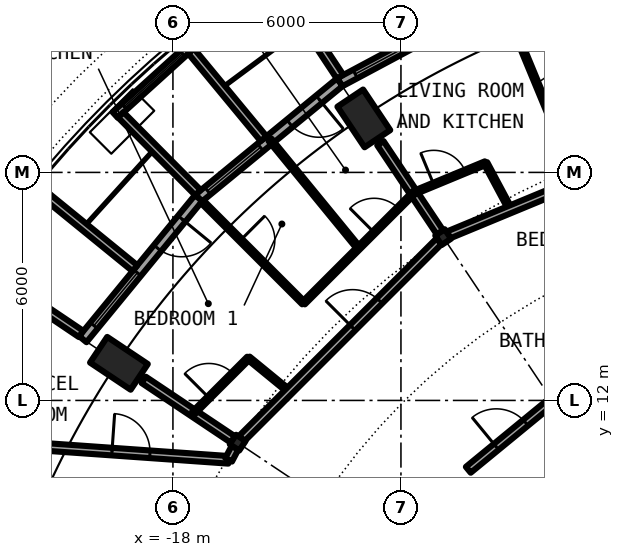
"""IFC4 building model, lengths in metres.
Left out: names, types, materials, properties, quantities, classifications, styles, units other than length and angle.
Written with IfcOpenShell. Run it as: python <this file> out.ifc"""

import sys

from ifc_helpers import new_model, si_unit, direction, frame, frame_2d, origin, origin_2d, place, context, subcontext, project, spatial, rectangle, circle, hollow_circle, i_section, extrude, element, fill, save


model = new_model("IFC4")
c1 = context("Model", 3, precision=1e-05, world=origin(), true_north=direction((0.0, 1.0)))
c2 = subcontext(c1, "Body", "Model", "MODEL_VIEW")
j1 = project(units=[si_unit("LENGTHUNIT", "METRE"), si_unit("PLANEANGLEUNIT", "RADIAN")], contexts=[c1])
p1 = place(None, origin())
s1 = spatial("IfcSite", under=j1, at=p1, CompositionType="ELEMENT")
p2 = place(p1, origin())
s2 = spatial("IfcBuilding", under=s1, at=p2, CompositionType="ELEMENT")
p3 = place(p2, frame((0.0, 0.0, 246.25)))
s3 = spatial("IfcBuildingStorey", under=s2, at=p3, CompositionType="ELEMENT", Elevation=246.25)
for number, where, z_axis, x_axis in (
    (1, (-13.334, 19.955, 0.0), (0.232, -0.347, 0.909), (0.831, 0.556, 0.0)),
    (2, (-19.955, 13.334, 0.0), (0.347, -0.232, 0.909), (0.556, 0.831, 0.0)),
):
    element("IfcColumn", number, at=place(p3, frame(where, z_axis=z_axis, x_axis=x_axis)), inside=s3, PredefinedType="COLUMN", context=c2, shape_type="SweptSolid", body=[
        extrude(hollow_circle(Radius=0.406, WallThickness=0.03, at=origin_2d()), origin(), (0.0, 0.0, 1.0), 3.081),
    ])
for number, where, z_axis, x_axis in (
    (3, (-10.889, 16.297, 0.0), (0.0, 0.0, 1.0), (-0.556, 0.831, 0.0)),
    (4, (-16.297, 10.889, 0.0), (0.0, 0.0, 1.0), (-0.831, 0.556, 0.0)),
):
    element("IfcColumn", number, at=place(p3, frame(where, z_axis=z_axis, x_axis=x_axis)), inside=s3, PredefinedType="COLUMN", context=c2, shape_type="SweptSolid", body=[
        extrude(i_section(OverallWidth=0.3, OverallDepth=0.3, WebThickness=0.011, FlangeThickness=0.019, FilletRadius=0.027, at=origin_2d()), origin(), (0.0, 0.0, 1.0), 3.05),
    ])
p4 = place(p3, frame((-9.376, 22.635, 0.0), z_axis=(0.0, 0.0, 1.0), x_axis=(-0.881903608701, -0.471429766731, 0.0)))
e5 = element("IfcWall", 5, at=p4, inside=s3, PredefinedType="SOLIDWALL", context=c2, shape_type="SweptSolid", body=[
    extrude(rectangle(XDim=4.802, YDim=0.25, at=frame_2d((2.401, 0.0))), origin(), (0.0, 0.0, 1.0), 2.7),
])
p5 = place(p4, frame((0.704, 0.0, 0.0)))
e6 = element("IfcOpeningElement", 6, at=p5, cuts=e5, PredefinedType="OPENING", context=c2, shape_type="SweptSolid", body=[
    extrude(rectangle(XDim=1.0, YDim=2.2, at=frame_2d((0.5, 1.1))), frame((0.0, 0.135, 0.0), z_axis=(0.0, -1.0, 0.0), x_axis=(1.0, 0.0, 0.0)), (0.0, 0.0, 1.0), 0.27),
])
p6 = place(p4, frame((2.542, 0.0, 0.3)))
e7 = element("IfcOpeningElement", 7, at=p6, cuts=e5, PredefinedType="OPENING", context=c2, shape_type="SweptSolid", body=[
    extrude(rectangle(XDim=1.8, YDim=2.1, at=frame_2d((0.9, 1.05))), frame((0.0, 0.135, 0.0), z_axis=(0.0, -1.0, 0.0), x_axis=(1.0, 0.0, 0.0)), (0.0, 0.0, 1.0), 0.27),
])
p7 = place(p3, frame((-13.603, 20.518, -0.03), z_axis=(0.0, 0.0, 1.0), x_axis=(-0.55248888476, 0.833520265031, 0.0)))
e8 = element("IfcWall", 8, at=p7, inside=s3, PredefinedType="SOLIDWALL", context=c2, shape_type="SweptSolid", body=[
    extrude(rectangle(XDim=2.882, YDim=0.2, at=frame_2d((1.441, 0.0))), origin(), (0.0, 0.0, 1.0), 2.73),
])
p8 = place(p3, frame((-13.611, 20.371, 0.0), z_axis=(0.0, 0.0, 1.0), x_axis=(-0.773007538262, -0.634396836208, 0.0)))
e9 = element("IfcWall", 9, at=p8, inside=s3, PredefinedType="SOLIDWALL", context=c2, shape_type="SweptSolid", body=[
    extrude(rectangle(XDim=4.803, YDim=0.25, at=frame_2d((2.402, 0.0))), origin(), (0.0, 0.0, 1.0), 2.7),
])
p9 = place(p8, frame((0.704, 0.0, 0.0)))
e10 = element("IfcOpeningElement", 10, at=p9, cuts=e9, PredefinedType="OPENING", context=c2, shape_type="SweptSolid", body=[
    extrude(rectangle(XDim=1.0, YDim=2.2, at=frame_2d((0.5, 1.1))), frame((0.0, 0.135, 0.0), z_axis=(0.0, -1.0, 0.0), x_axis=(1.0, 0.0, 0.0)), (0.0, 0.0, 1.0), 0.27),
])
p10 = place(p8, frame((2.699, 0.0, 0.3)))
e11 = element("IfcOpeningElement", 11, at=p10, cuts=e9, PredefinedType="OPENING", context=c2, shape_type="SweptSolid", body=[
    extrude(rectangle(XDim=1.8, YDim=2.1, at=frame_2d((0.9, 1.05))), frame((0.0, 0.135, 0.0), z_axis=(0.0, -1.0, 0.0), x_axis=(1.0, 0.0, 0.0)), (0.0, 0.0, 1.0), 0.27),
])
p11 = place(p3, frame((-17.506, 21.338, -0.03), z_axis=(0.0, 0.0, 1.0), x_axis=(-0.741016284298, -0.671487056022, 0.0)))
e12 = element("IfcWall", 12, at=p11, inside=s3, PredefinedType="SOLIDWALL", context=c2, shape_type="SweptSolid", body=[
    extrude(rectangle(XDim=2.718, YDim=0.2, at=frame_2d((1.359, 0.0))), origin(), (0.0, 0.0, 1.0), 2.73),
])
p12 = place(p11, frame((0.319, 0.0, 0.33)))
e13 = element("IfcOpeningElement", 13, at=p12, cuts=e12, PredefinedType="OPENING", context=c2, shape_type="SweptSolid", body=[
    extrude(circle(Radius=1.04, at=frame_2d((1.04, 1.04))), frame((0.0, 0.11, 0.0), z_axis=(0.0, -1.0, 0.0), x_axis=(1.0, 0.0, 0.0)), (0.0, 0.0, 1.0), 0.22),
])
p13 = place(p3, frame((-15.615, 18.888, -0.03), z_axis=(0.0, 0.0, 1.0), x_axis=(-0.637452521862, 0.770489638069, 0.0)))
e14 = element("IfcWall", 14, at=p13, inside=s3, PredefinedType="SOLIDWALL", context=c2, shape_type="SweptSolid", body=[
    extrude(rectangle(XDim=2.993, YDim=0.2, at=frame_2d((1.497, 0.0))), origin(), (0.0, 0.0, 1.0), 2.73),
])
p14 = place(p3, frame((-17.344, 17.47, -0.03), z_axis=(0.0, 0.0, 1.0), x_axis=(-0.704306055012, 0.709896457854, 0.0)))
e15 = element("IfcWall", 15, at=p14, inside=s3, PredefinedType="SOLIDWALL", context=c2, shape_type="SweptSolid", body=[
    extrude(rectangle(XDim=2.882, YDim=0.2, at=frame_2d((1.441, 0.0))), origin(), (0.0, 0.0, 1.0), 2.73),
])
p15 = place(p3, frame((-17.324, 17.324, 0.0), z_axis=(0.0, 0.0, 1.0), x_axis=(-0.634396836208, -0.773007538262, 0.0)))
e16 = element("IfcWall", 16, at=p15, inside=s3, PredefinedType="SOLIDWALL", context=c2, shape_type="SweptSolid", body=[
    extrude(rectangle(XDim=4.803, YDim=0.25, at=frame_2d((2.402, 0.0))), origin(), (0.0, 0.0, 1.0), 2.7),
])
p16 = place(p15, frame((0.704, 0.0, 0.0)))
e17 = element("IfcOpeningElement", 17, at=p16, cuts=e16, PredefinedType="OPENING", context=c2, shape_type="SweptSolid", body=[
    extrude(rectangle(XDim=1.0, YDim=2.2, at=frame_2d((0.5, 1.1))), frame((0.0, 0.135, 0.0), z_axis=(0.0, -1.0, 0.0), x_axis=(1.0, 0.0, 0.0)), (0.0, 0.0, 1.0), 0.27),
])
p17 = place(p15, frame((2.542, 0.0, 0.3)))
e18 = element("IfcOpeningElement", 18, at=p17, cuts=e16, PredefinedType="OPENING", context=c2, shape_type="SweptSolid", body=[
    extrude(rectangle(XDim=1.8, YDim=2.1, at=frame_2d((0.9, 1.05))), frame((0.0, 0.135, 0.0), z_axis=(0.0, -1.0, 0.0), x_axis=(1.0, 0.0, 0.0)), (0.0, 0.0, 1.0), 0.27),
])
p18 = place(p3, frame((-19.0, 15.479, -0.03), z_axis=(0.0, 0.0, 1.0), x_axis=(-0.775612161439, 0.631209771017, 0.0)))
e19 = element("IfcWall", 19, at=p18, inside=s3, PredefinedType="SOLIDWALL", context=c2, shape_type="SweptSolid", body=[
    extrude(rectangle(XDim=2.992, YDim=0.2, at=frame_2d((1.496, 0.0))), origin(), (0.0, 0.0, 1.0), 2.73),
])
p19 = place(p3, frame((-20.419, 13.75, -0.03), z_axis=(0.0, 0.0, 1.0), x_axis=(-0.829211810515, 0.558934498222, 0.0)))
e20 = element("IfcWall", 20, at=p19, inside=s3, PredefinedType="SOLIDWALL", context=c2, shape_type="SweptSolid", body=[
    extrude(rectangle(XDim=2.882, YDim=0.2, at=frame_2d((1.441, 0.0))), origin(), (0.0, 0.0, 1.0), 2.73),
])
p20 = place(p3, frame((-9.774, 18.245, 0.0), z_axis=(0.0, 0.0, 1.0), x_axis=(0.471597872193, -0.881813725762, 0.0)))
e21 = element("IfcWall", 21, at=p20, inside=s3, PredefinedType="PARTITIONING", context=c2, shape_type="SweptSolid", body=[
    extrude(rectangle(XDim=1.38, YDim=0.1, at=frame_2d((0.69, 0.0))), origin(), (0.0, 0.0, 1.0), 2.7),
])
p21 = place(p3, frame((-18.769, 12.541, 0.0), z_axis=(0.0, 0.0, 1.0), x_axis=(0.83131782921, -0.555797325324, 0.0)))
e22 = element("IfcWall", 22, at=p21, inside=s3, PredefinedType="PARTITIONING", context=c2, shape_type="SweptSolid", body=[
    extrude(rectangle(XDim=2.823, YDim=0.2, at=frame_2d((1.412, 0.0))), origin(), (0.0, 0.0, 1.0), 2.7),
])
p22 = place(p3, frame((-17.236, 17.236, 0.0), z_axis=(0.0, 0.0, 1.0), x_axis=(0.707106781187, -0.707106781187, 0.0)))
e23 = element("IfcWall", 23, at=p22, inside=s3, PredefinedType="PARTITIONING", context=c2, shape_type="SweptSolid", body=[
    extrude(rectangle(XDim=3.779, YDim=0.1, at=frame_2d((1.89, 0.0))), origin(), (0.0, 0.0, 1.0), 2.7),
])
p23 = place(p22, frame((1.439, 0.0, 0.0)))
e24 = element("IfcOpeningElement", 24, at=p23, cuts=e23, PredefinedType="OPENING", context=c2, shape_type="SweptSolid", body=[
    extrude(rectangle(XDim=0.9, YDim=2.3, at=frame_2d((0.45, 1.15))), frame((0.0, 0.06, 0.0), z_axis=(0.0, -1.0, 0.0), x_axis=(1.0, 0.0, 0.0)), (0.0, 0.0, 1.0), 0.12),
])
p24 = place(p3, frame((-16.012, 13.115, 0.0), z_axis=(0.0, 0.0, 1.0), x_axis=(0.773562805085, -0.633719643525, 0.0)))
e25 = element("IfcWall", 25, at=p24, inside=s3, PredefinedType="PARTITIONING", context=c2, shape_type="SweptSolid", body=[
    extrude(rectangle(XDim=1.379, YDim=0.1, at=frame_2d((0.689, 0.0))), origin(), (0.0, 0.0, 1.0), 2.7),
])
p25 = place(p3, frame((-15.445, 18.857, 0.0), z_axis=(0.0, 0.0, 1.0), x_axis=(0.633624546958, -0.773640700514, 0.0)))
e26 = element("IfcWall", 26, at=p25, inside=s3, PredefinedType="PARTITIONING", context=c2, shape_type="SweptSolid", body=[
    extrude(rectangle(XDim=3.677, YDim=0.1, at=frame_2d((1.839, 0.0))), origin(), (0.0, 0.0, 1.0), 2.7),
])
p26 = place(p3, frame((-12.541, 18.769, 0.0), z_axis=(0.0, 0.0, 1.0), x_axis=(0.555797325324, -0.83131782921, 0.0)))
e27 = element("IfcWall", 27, at=p26, inside=s3, PredefinedType="PARTITIONING", context=c2, shape_type="SweptSolid", body=[
    extrude(rectangle(XDim=2.823, YDim=0.2, at=frame_2d((1.412, 0.0))), origin(), (0.0, 0.0, 1.0), 2.7),
])
p27 = place(p3, frame((-9.328, 22.52, 0.0), z_axis=(0.0, 0.0, 1.0), x_axis=(0.382637120452, -0.923898714174, 0.0)))
e28 = element("IfcWall", 28, at=p27, inside=s3, PredefinedType="PARTITIONING", context=c2, shape_type="SweptSolid", body=[
    extrude(rectangle(XDim=3.779, YDim=0.1, at=frame_2d((1.889, 0.0))), origin(), (0.0, 0.0, 1.0), 2.7),
])
p28 = place(p27, frame((1.439, 0.0, 0.0)))
e29 = element("IfcOpeningElement", 29, at=p28, cuts=e28, PredefinedType="OPENING", context=c2, shape_type="SweptSolid", body=[
    extrude(rectangle(XDim=0.9, YDim=2.3, at=frame_2d((0.45, 1.15))), frame((0.0, 0.06, 0.0), z_axis=(0.0, -1.0, 0.0), x_axis=(1.0, 0.0, 0.0)), (0.0, 0.0, 1.0), 0.12),
])
p29 = place(p3, frame((-21.675, 10.8, 0.0), z_axis=(0.0, 0.0, 1.0), x_axis=(0.997515141784, -0.070452408845, 0.0)))
e30 = element("IfcWall", 30, at=p29, inside=s3, PredefinedType="PARTITIONING", context=c2, shape_type="SweptSolid", body=[
    extrude(rectangle(XDim=5.153, YDim=0.2, at=frame_2d((2.576, 0.0))), origin(), (0.0, 0.0, 1.0), 2.7),
])
p30 = place(p29, frame((2.076, 0.0, 0.0)))
e31 = element("IfcOpeningElement", 31, at=p30, cuts=e30, PredefinedType="OPENING", context=c2, shape_type="SweptSolid", body=[
    extrude(rectangle(XDim=1.0, YDim=2.3, at=frame_2d((0.5, 1.15))), frame((0.0, 0.11, 0.0), z_axis=(0.0, -1.0, 0.0), x_axis=(1.0, 0.0, 0.0)), (0.0, 0.0, 1.0), 0.22),
])
p31 = place(p3, frame((-10.228, 10.175, 0.0), z_axis=(0.0, 0.0, 1.0), x_axis=(0.772989261861, 0.634419105204, 0.0)))
e32 = element("IfcWall", 32, at=p31, inside=s3, PredefinedType="PARTITIONING", context=c2, shape_type="SweptSolid", body=[
    extrude(rectangle(XDim=5.803, YDim=0.2, at=frame_2d((2.902, 0.0))), origin(), (0.0, 0.0, 1.0), 2.7),
])
p32 = place(p31, frame((0.952, 0.0, 0.0)))
e33 = element("IfcOpeningElement", 33, at=p32, cuts=e32, PredefinedType="OPENING", context=c2, shape_type="SweptSolid", body=[
    extrude(rectangle(XDim=1.0, YDim=2.3, at=frame_2d((0.5, 1.15))), frame((0.0, 0.11, 0.0), z_axis=(0.0, -1.0, 0.0), x_axis=(1.0, 0.0, 0.0)), (0.0, 0.0, 1.0), 0.22),
])
p33 = place(p3, frame((-16.189, 10.997, 0.0), z_axis=(0.0, 0.0, 1.0), x_axis=(0.707106781187, 0.707106781187, 0.0)))
e34 = element("IfcWall", 34, at=p33, inside=s3, PredefinedType="PARTITIONING", context=c2, shape_type="SweptSolid", body=[
    extrude(rectangle(XDim=7.343, YDim=0.2, at=frame_2d((3.671, 0.0))), origin(), (0.0, 0.0, 1.0), 2.45),
])
p34 = place(p33, frame((4.127, 0.0, 0.0)))
e35 = element("IfcOpeningElement", 35, at=p34, cuts=e34, PredefinedType="OPENING", context=c2, shape_type="SweptSolid", body=[
    extrude(rectangle(XDim=1.0, YDim=2.3, at=frame_2d((0.5, 1.15))), frame((0.0, 0.11, 0.0), z_axis=(0.0, -1.0, 0.0), x_axis=(1.0, 0.0, 0.0)), (0.0, 0.0, 1.0), 0.22),
])
p35 = place(p3, frame((-10.748, 16.355, 0.0), z_axis=(0.0, 0.0, 1.0), x_axis=(0.92395118465, 0.382510402975, 0.0)))
e36 = element("IfcWall", 36, at=p35, inside=s3, PredefinedType="PARTITIONING", context=c2, shape_type="SweptSolid", body=[
    extrude(rectangle(XDim=7.341, YDim=0.2, at=frame_2d((3.671, 0.0))), origin(), (0.0, 0.0, 1.0), 2.45),
])
p36 = place(p35, frame((4.127, 0.0, 0.0)))
e37 = element("IfcOpeningElement", 37, at=p36, cuts=e36, PredefinedType="OPENING", context=c2, shape_type="SweptSolid", body=[
    extrude(rectangle(XDim=1.0, YDim=2.3, at=frame_2d((0.5, 1.15))), frame((0.0, 0.11, 0.0), z_axis=(0.0, -1.0, 0.0), x_axis=(1.0, 0.0, 0.0)), (0.0, 0.0, 1.0), 0.22),
])
p37 = place(p3, frame((-16.535, 10.437, 0.0), z_axis=(0.0, 0.0, 1.0), x_axis=(0.465802239822, 0.884888848035, 0.0)))
e38 = element("IfcWall", 38, at=p37, inside=s3, PredefinedType="PARTITIONING", context=c2, shape_type="SweptSolid", body=[
    extrude(rectangle(XDim=0.361, YDim=0.2, at=frame_2d((0.18, 0.0))), origin(), (0.0, 0.0, 1.0), 2.7),
])
p38 = place(p3, frame((-17.461, 11.667, 0.0), z_axis=(0.0, 0.0, 1.0), x_axis=(0.707345104989, 0.706868377032, 0.0)))
e39 = element("IfcWall", 39, at=p38, inside=s3, PredefinedType="PARTITIONING", context=c2, shape_type="SweptSolid", body=[
    extrude(rectangle(XDim=2.049, YDim=0.1, at=frame_2d((1.024, 0.0))), origin(), (0.0, 0.0, 1.0), 2.7),
])
p39 = place(p38, frame((0.574, 0.0, 0.0)))
e40 = element("IfcOpeningElement", 40, at=p39, cuts=e39, PredefinedType="OPENING", context=c2, shape_type="SweptSolid", body=[
    extrude(rectangle(XDim=0.9, YDim=2.3, at=frame_2d((0.45, 1.15))), frame((0.0, 0.06, 0.0), z_axis=(0.0, -1.0, 0.0), x_axis=(1.0, 0.0, 0.0)), (0.0, 0.0, 1.0), 0.12),
])
p40 = place(p3, frame((-14.563, 14.563, 0.0), z_axis=(0.0, 0.0, 1.0), x_axis=(0.707344284494, 0.70686919808, 0.0)))
e41 = element("IfcWall", 41, at=p40, inside=s3, PredefinedType="PARTITIONING", context=c2, shape_type="SweptSolid", body=[
    extrude(rectangle(XDim=4.111, YDim=0.1, at=frame_2d((2.056, 0.0))), origin(), (0.0, 0.0, 1.0), 2.7),
])
p41 = place(p40, frame((2.626, 0.0, 0.0)))
e42 = element("IfcOpeningElement", 42, at=p41, cuts=e41, PredefinedType="OPENING", context=c2, shape_type="SweptSolid", body=[
    extrude(rectangle(XDim=0.9, YDim=2.3, at=frame_2d((0.45, 1.15))), frame((0.0, 0.06, 0.0), z_axis=(0.0, -1.0, 0.0), x_axis=(1.0, 0.0, 0.0)), (0.0, 0.0, 1.0), 0.12),
])
p42 = place(p3, frame((-11.667, 17.461, 0.0), z_axis=(0.0, 0.0, 1.0), x_axis=(0.923871611223, 0.382702555487, 0.0)))
e43 = element("IfcWall", 43, at=p42, inside=s3, PredefinedType="PARTITIONING", context=c2, shape_type="SweptSolid", body=[
    extrude(rectangle(XDim=2.049, YDim=0.1, at=frame_2d((1.024, 0.0))), origin(), (0.0, 0.0, 1.0), 2.7),
])
p43 = place(p42, frame((0.574, 0.0, 0.0)))
e44 = element("IfcOpeningElement", 44, at=p43, cuts=e43, PredefinedType="OPENING", context=c2, shape_type="SweptSolid", body=[
    extrude(rectangle(XDim=0.9, YDim=2.3, at=frame_2d((0.45, 1.15))), frame((0.0, 0.06, 0.0), z_axis=(0.0, -1.0, 0.0), x_axis=(1.0, 0.0, 0.0)), (0.0, 0.0, 1.0), 0.12),
])
p44 = place(p6, origin())
e45 = element("IfcWindow", 45, at=p44, inside=s3, PartitioningType="SINGLE_PANEL", PredefinedType="WINDOW", context=c2, shape_type="SweptSolid", body=[
    extrude(rectangle(XDim=1.8, YDim=2.1, at=frame_2d((0.9, 1.05))), frame((0.0, 0.03, 0.0), z_axis=(0.0, -1.0, 0.0), x_axis=(1.0, 0.0, 0.0)), (0.0, 0.0, 1.0), 0.06),
])
fill(e7, e45)
p45 = place(p9, origin())
e46 = element("IfcDoor", 46, at=p45, inside=s3, OperationType="SINGLE_SWING_LEFT", PredefinedType="DOOR", context=c2, shape_type="SweptSolid", body=[
    extrude(rectangle(XDim=1.0, YDim=2.2, at=frame_2d((0.5, 1.1))), frame((0.0, 0.025, 0.0), z_axis=(0.0, -1.0, 0.0), x_axis=(1.0, 0.0, 0.0)), (0.0, 0.0, 1.0), 0.05),
])
fill(e10, e46)
p46 = place(p10, origin())
e47 = element("IfcWindow", 47, at=p46, inside=s3, PartitioningType="SINGLE_PANEL", PredefinedType="WINDOW", context=c2, shape_type="SweptSolid", body=[
    extrude(rectangle(XDim=1.8, YDim=2.1, at=frame_2d((0.9, 1.05))), frame((0.0, 0.03, 0.0), z_axis=(0.0, -1.0, 0.0), x_axis=(1.0, 0.0, 0.0)), (0.0, 0.0, 1.0), 0.06),
])
fill(e11, e47)
p47 = place(p12, origin())
e48 = element("IfcWindow", 48, at=p47, inside=s3, PartitioningType="SINGLE_PANEL", PredefinedType="WINDOW", context=c2, shape_type="SweptSolid", body=[
    extrude(circle(Radius=1.04, at=frame_2d((1.04, 1.04))), frame((0.0, 0.03, 0.0), z_axis=(0.0, -1.0, 0.0), x_axis=(1.0, 0.0, 0.0)), (0.0, 0.0, 1.0), 0.06),
])
fill(e13, e48)
p48 = place(p16, origin())
e49 = element("IfcDoor", 49, at=p48, inside=s3, OperationType="SINGLE_SWING_LEFT", PredefinedType="DOOR", context=c2, shape_type="SweptSolid", body=[
    extrude(rectangle(XDim=1.0, YDim=2.2, at=frame_2d((0.5, 1.1))), frame((0.0, 0.025, 0.0), z_axis=(0.0, -1.0, 0.0), x_axis=(1.0, 0.0, 0.0)), (0.0, 0.0, 1.0), 0.05),
])
fill(e17, e49)
p49 = place(p17, origin())
e50 = element("IfcWindow", 50, at=p49, inside=s3, PartitioningType="SINGLE_PANEL", PredefinedType="WINDOW", context=c2, shape_type="SweptSolid", body=[
    extrude(rectangle(XDim=1.8, YDim=2.1, at=frame_2d((0.9, 1.05))), frame((0.0, 0.03, 0.0), z_axis=(0.0, -1.0, 0.0), x_axis=(1.0, 0.0, 0.0)), (0.0, 0.0, 1.0), 0.06),
])
fill(e18, e50)
p50 = place(p43, origin())
e51 = element("IfcDoor", 51, at=p50, inside=s3, OperationType="SINGLE_SWING_LEFT", PredefinedType="DOOR", context=c2, shape_type="SweptSolid", body=[
    extrude(rectangle(XDim=0.9, YDim=2.3, at=frame_2d((0.45, 1.15))), frame((0.0, 0.025, 0.0), z_axis=(0.0, -1.0, 0.0), x_axis=(1.0, 0.0, 0.0)), (0.0, 0.0, 1.0), 0.05),
])
fill(e44, e51)
p51 = place(p28, origin())
e52 = element("IfcDoor", 52, at=p51, inside=s3, OperationType="SINGLE_SWING_RIGHT", PredefinedType="DOOR", context=c2, shape_type="SweptSolid", body=[
    extrude(rectangle(XDim=0.9, YDim=2.3, at=frame_2d((0.45, 1.15))), frame((0.0, 0.025, 0.0), z_axis=(0.0, -1.0, 0.0), x_axis=(1.0, 0.0, 0.0)), (0.0, 0.0, 1.0), 0.05),
])
fill(e29, e52)
p52 = place(p34, origin())
e53 = element("IfcDoor", 53, at=p52, inside=s3, OperationType="SINGLE_SWING_RIGHT", PredefinedType="DOOR", context=c2, shape_type="SweptSolid", body=[
    extrude(rectangle(XDim=1.0, YDim=2.3, at=frame_2d((0.5, 1.15))), frame((0.0, 0.025, 0.0), z_axis=(0.0, -1.0, 0.0), x_axis=(1.0, 0.0, 0.0)), (0.0, 0.0, 1.0), 0.05),
])
fill(e35, e53)
p53 = place(p39, origin())
e54 = element("IfcDoor", 54, at=p53, inside=s3, OperationType="SINGLE_SWING_LEFT", PredefinedType="DOOR", context=c2, shape_type="SweptSolid", body=[
    extrude(rectangle(XDim=0.9, YDim=2.3, at=frame_2d((0.45, 1.15))), frame((0.0, 0.025, 0.0), z_axis=(0.0, -1.0, 0.0), x_axis=(1.0, 0.0, 0.0)), (0.0, 0.0, 1.0), 0.05),
])
fill(e40, e54)
p54 = place(p23, origin())
e55 = element("IfcDoor", 55, at=p54, inside=s3, OperationType="SINGLE_SWING_RIGHT", PredefinedType="DOOR", context=c2, shape_type="SweptSolid", body=[
    extrude(rectangle(XDim=0.9, YDim=2.3, at=frame_2d((0.45, 1.15))), frame((0.0, 0.025, 0.0), z_axis=(0.0, -1.0, 0.0), x_axis=(1.0, 0.0, 0.0)), (0.0, 0.0, 1.0), 0.05),
])
fill(e24, e55)
p55 = place(p41, origin())
e56 = element("IfcDoor", 56, at=p55, inside=s3, OperationType="SINGLE_SWING_RIGHT", PredefinedType="DOOR", context=c2, shape_type="SweptSolid", body=[
    extrude(rectangle(XDim=0.9, YDim=2.3, at=frame_2d((0.45, 1.15))), frame((0.0, 0.025, 0.0), z_axis=(0.0, -1.0, 0.0), x_axis=(1.0, 0.0, 0.0)), (0.0, 0.0, 1.0), 0.05),
])
fill(e42, e56)
p56 = place(p32, origin())
e57 = element("IfcDoor", 57, at=p56, inside=s3, OperationType="SINGLE_SWING_LEFT", PredefinedType="DOOR", context=c2, shape_type="SweptSolid", body=[
    extrude(rectangle(XDim=1.0, YDim=2.3, at=frame_2d((0.5, 1.15))), frame((0.0, 0.025, 0.0), z_axis=(0.0, -1.0, 0.0), x_axis=(1.0, 0.0, 0.0)), (0.0, 0.0, 1.0), 0.05),
])
fill(e33, e57)
p57 = place(p30, origin())
e58 = element("IfcDoor", 58, at=p57, inside=s3, OperationType="SINGLE_SWING_RIGHT", PredefinedType="DOOR", context=c2, shape_type="SweptSolid", body=[
    extrude(rectangle(XDim=1.0, YDim=2.3, at=frame_2d((0.5, 1.15))), frame((0.0, 0.025, 0.0), z_axis=(0.0, -1.0, 0.0), x_axis=(1.0, 0.0, 0.0)), (0.0, 0.0, 1.0), 0.05),
])
fill(e31, e58)
save(model, sys.argv[1])
